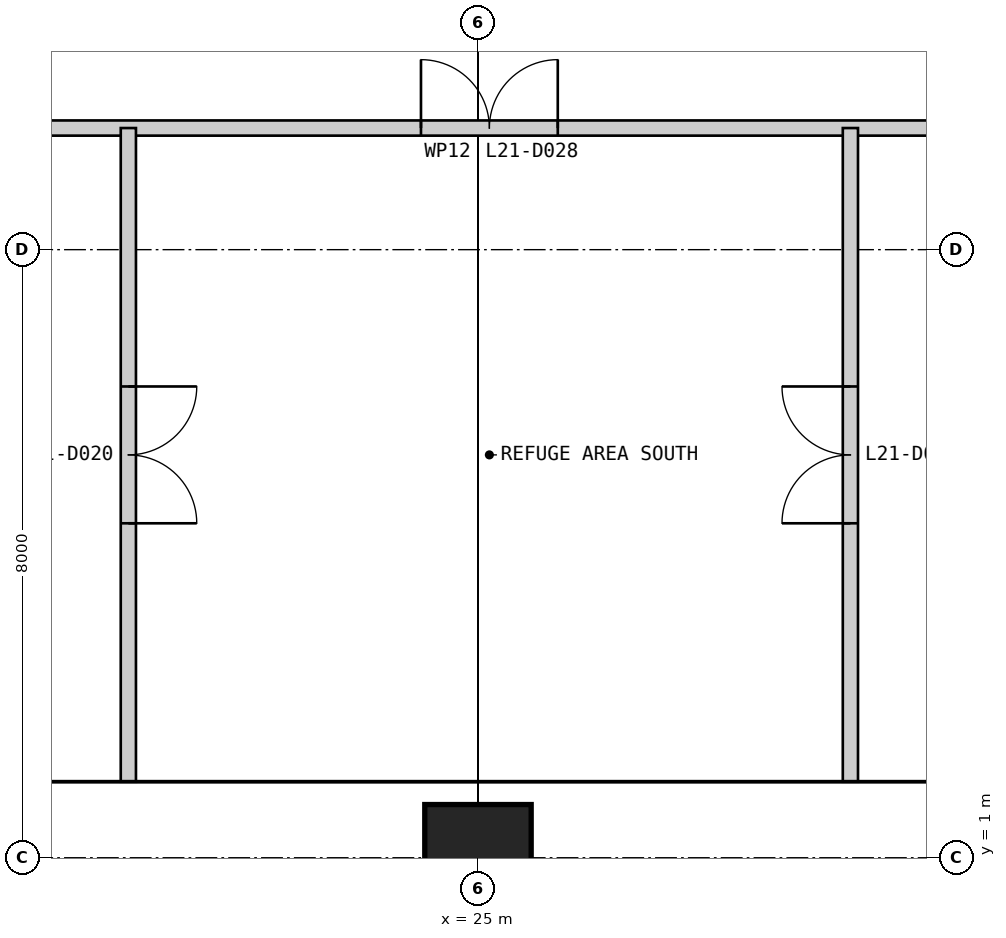
"""IFC4 building model, lengths in metres.
Left out: names, types, materials, properties, quantities, classifications, styles, units other than length and angle.
Written with IfcOpenShell. Run it as: python <this file> out.ifc"""

import sys

from ifc_helpers import new_model, si_unit, direction, frame, frame_2d, origin, origin_2d, place, context, subcontext, project, spatial, rectangle, extrude, element, fill, save


model = new_model("IFC4")
c1 = context("Model", 3, precision=1e-05, world=origin(), true_north=direction((0.0, 1.0)))
c2 = subcontext(c1, "Body", "Model", "MODEL_VIEW")
j1 = project(units=[si_unit("LENGTHUNIT", "METRE"), si_unit("PLANEANGLEUNIT", "RADIAN")], contexts=[c1])
p1 = place(None, origin())
s1 = spatial("IfcSite", under=j1, at=p1, CompositionType="ELEMENT")
p2 = place(p1, origin())
s2 = spatial("IfcBuilding", under=s1, at=p2, CompositionType="ELEMENT")
p3 = place(p2, frame((0.0, 0.0, 91.0)))
s3 = spatial("IfcBuildingStorey", under=s2, at=p3, CompositionType="ELEMENT", Elevation=91.0)
p4 = place(p3, frame((25.0, 1.0, 0.0), z_axis=(0.0, 0.0, 1.0), x_axis=(1.0, 0.0, 0.0)))
e1 = element("IfcColumn", 1, at=p4, inside=s3, PredefinedType="COLUMN", context=c2, shape_type="SweptSolid", body=[
    extrude(rectangle(XDim=1.4, YDim=1.4, at=origin_2d()), origin(), (0.0, 0.0, 1.0), 6.0),
])
p5 = place(p3, frame((13.0, 10.6, 0.0), z_axis=(0.0, 0.0, 1.0), x_axis=(1.0, 0.0, 0.0)))
e2 = element("IfcWall", 2, at=p5, inside=s3, PredefinedType="PARTITIONING", context=c2, shape_type="SweptSolid", body=[
    extrude(rectangle(XDim=24.0, YDim=0.2, at=frame_2d((12.0, 0.0))), origin(), (0.0, 0.0, 1.0), 5.8),
])
p6 = place(p5, frame((2.8, 0.0, 0.0)))
e3 = element("IfcOpeningElement", 3, at=p6, cuts=e2, PredefinedType="OPENING", context=c2, shape_type="SweptSolid", body=[
    extrude(rectangle(XDim=1.8, YDim=2.4, at=frame_2d((0.9, 1.2))), frame((0.0, 0.11, 0.0), z_axis=(0.0, -1.0, 0.0), x_axis=(1.0, 0.0, 0.0)), (0.0, 0.0, 1.0), 0.22),
])
p7 = place(p5, frame((11.25, 0.0, 0.0)))
e4 = element("IfcOpeningElement", 4, at=p7, cuts=e2, PredefinedType="OPENING", context=c2, shape_type="SweptSolid", body=[
    extrude(rectangle(XDim=1.8, YDim=2.4, at=frame_2d((0.9, 1.2))), frame((0.0, 0.11, 0.0), z_axis=(0.0, -1.0, 0.0), x_axis=(1.0, 0.0, 0.0)), (0.0, 0.0, 1.0), 0.22),
])
p8 = place(p5, frame((19.55, 0.0, 0.0)))
e5 = element("IfcOpeningElement", 5, at=p8, cuts=e2, PredefinedType="OPENING", context=c2, shape_type="SweptSolid", body=[
    extrude(rectangle(XDim=1.8, YDim=2.4, at=frame_2d((0.9, 1.2))), frame((0.0, 0.11, 0.0), z_axis=(0.0, -1.0, 0.0), x_axis=(1.0, 0.0, 0.0)), (0.0, 0.0, 1.0), 0.22),
])
p9 = place(p3, frame((20.4, 2.0, 0.0), z_axis=(0.0, 0.0, 1.0), x_axis=(0.0, 1.0, 0.0)))
e6 = element("IfcWall", 6, at=p9, inside=s3, PredefinedType="PARTITIONING", context=c2, shape_type="SweptSolid", body=[
    extrude(rectangle(XDim=8.6, YDim=0.2, at=frame_2d((4.3, 0.0))), origin(), (0.0, 0.0, 1.0), 5.8),
])
p10 = place(p9, frame((3.4, 0.0, 0.0)))
e7 = element("IfcOpeningElement", 7, at=p10, cuts=e6, PredefinedType="OPENING", context=c2, shape_type="SweptSolid", body=[
    extrude(rectangle(XDim=1.8, YDim=2.4, at=frame_2d((0.9, 1.2))), frame((0.0, 0.11, 0.0), z_axis=(0.0, -1.0, 0.0), x_axis=(1.0, 0.0, 0.0)), (0.0, 0.0, 1.0), 0.22),
])
p11 = place(p3, frame((29.9, 2.0, 0.0), z_axis=(0.0, 0.0, 1.0), x_axis=(0.0, 1.0, 0.0)))
e8 = element("IfcWall", 8, at=p11, inside=s3, PredefinedType="PARTITIONING", context=c2, shape_type="SweptSolid", body=[
    extrude(rectangle(XDim=8.6, YDim=0.2, at=frame_2d((4.3, 0.0))), origin(), (0.0, 0.0, 1.0), 5.8),
])
p12 = place(p11, frame((3.4, 0.0, 0.0)))
e9 = element("IfcOpeningElement", 9, at=p12, cuts=e8, PredefinedType="OPENING", context=c2, shape_type="SweptSolid", body=[
    extrude(rectangle(XDim=1.8, YDim=2.4, at=frame_2d((0.9, 1.2))), frame((0.0, 0.11, 0.0), z_axis=(0.0, -1.0, 0.0), x_axis=(1.0, 0.0, 0.0)), (0.0, 0.0, 1.0), 0.22),
])
p13 = place(p10, frame((1.8, 0.0, 0.0), z_axis=(0.0, 0.0, 1.0), x_axis=(-1.0, 0.0, 0.0)))
e10 = element("IfcDoor", 10, at=p13, inside=s3, OperationType="DOUBLE_DOOR_SINGLE_SWING", PredefinedType="DOOR", context=c2, shape_type="SweptSolid", body=[
    extrude(rectangle(XDim=1.8, YDim=2.4, at=frame_2d((0.9, 1.2))), frame((0.0, 0.025, 0.0), z_axis=(0.0, -1.0, 0.0), x_axis=(1.0, 0.0, 0.0)), (0.0, 0.0, 1.0), 0.05),
])
fill(e7, e10)
p14 = place(p12, origin())
e11 = element("IfcDoor", 11, at=p14, inside=s3, OperationType="DOUBLE_DOOR_SINGLE_SWING", PredefinedType="DOOR", context=c2, shape_type="SweptSolid", body=[
    extrude(rectangle(XDim=1.8, YDim=2.4, at=frame_2d((0.9, 1.2))), frame((0.0, 0.025, 0.0), z_axis=(0.0, -1.0, 0.0), x_axis=(1.0, 0.0, 0.0)), (0.0, 0.0, 1.0), 0.05),
])
fill(e9, e11)
p15 = place(p7, origin())
e12 = element("IfcDoor", 12, at=p15, inside=s3, OperationType="DOUBLE_DOOR_SINGLE_SWING", PredefinedType="DOOR", context=c2, shape_type="SweptSolid", body=[
    extrude(rectangle(XDim=1.8, YDim=2.4, at=frame_2d((0.9, 1.2))), frame((0.0, 0.025, 0.0), z_axis=(0.0, -1.0, 0.0), x_axis=(1.0, 0.0, 0.0)), (0.0, 0.0, 1.0), 0.05),
])
fill(e4, e12)
save(model, sys.argv[1])
